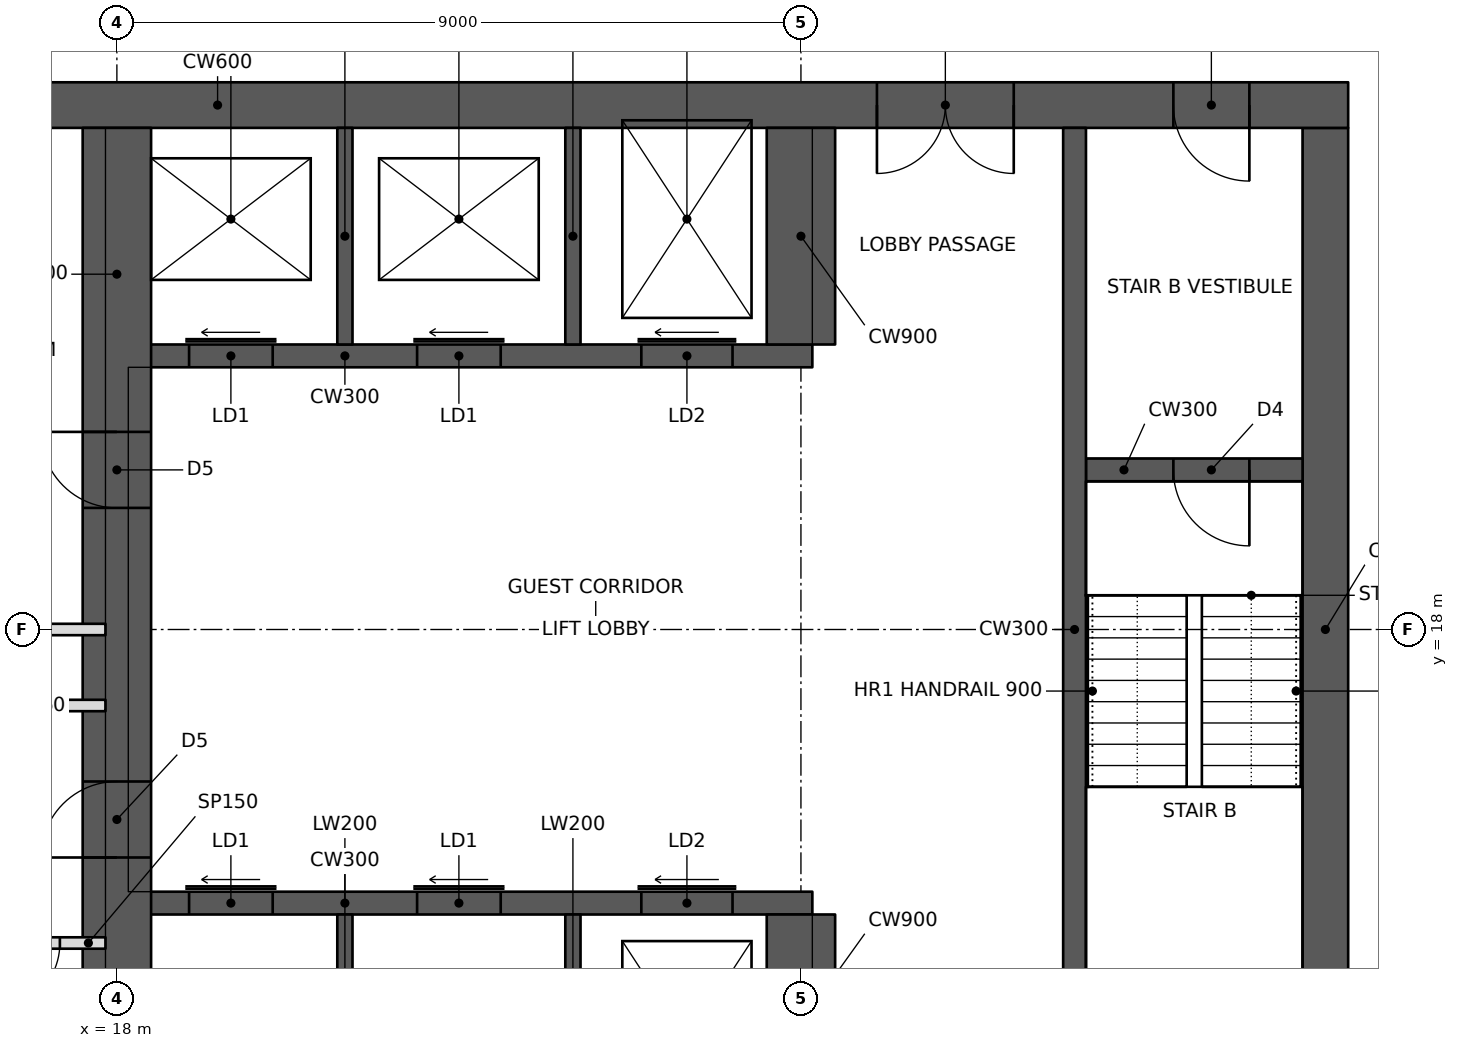
"""IFC4 building model, lengths in metres.
Left out: names, types, materials, properties, quantities, classifications, styles, units other than length and angle.
Written with IfcOpenShell. Run it as: python <this file> out.ifc"""

import sys

from ifc_helpers import new_model, si_unit, direction, frame, frame_2d, origin, place, context, subcontext, project, spatial, rectangle, extrude, element, fill, save


model = new_model("IFC4")
c1 = context("Model", 3, precision=1e-05, world=origin(), true_north=direction((0.0, 1.0)))
c2 = subcontext(c1, "Body", "Model", "MODEL_VIEW")
j1 = project(units=[si_unit("LENGTHUNIT", "METRE"), si_unit("PLANEANGLEUNIT", "RADIAN")], contexts=[c1])
p1 = place(None, origin())
s1 = spatial("IfcSite", under=j1, at=p1, CompositionType="ELEMENT")
p2 = place(p1, origin())
s2 = spatial("IfcBuilding", under=s1, at=p2, CompositionType="ELEMENT")
p3 = place(p2, frame((0.0, 0.0, 94.2)))
s3 = spatial("IfcBuildingStorey", under=s2, at=p3, CompositionType="ELEMENT", Elevation=94.2)
p4 = place(p3, frame((10.8, 24.9, 0.0), z_axis=(0.0, 0.0, 1.0), x_axis=(1.0, 0.0, 0.0)))
e1 = element("IfcWall", 1, at=p4, inside=s3, PredefinedType="SHEAR", context=c2, shape_type="SweptSolid", body=[
    extrude(rectangle(XDim=23.4, YDim=0.6, at=frame_2d((11.7, 0.0))), origin(), (0.0, 0.0, 1.0), 3.4),
])
p5 = place(p4, frame((17.2, 0.0, 0.0)))
e2 = element("IfcOpeningElement", 2, at=p5, cuts=e1, PredefinedType="OPENING", context=c2, shape_type="SweptSolid", body=[
    extrude(rectangle(XDim=1.8, YDim=2.1, at=frame_2d((0.9, 1.05))), frame((0.0, 0.31, 0.0), z_axis=(0.0, -1.0, 0.0), x_axis=(1.0, 0.0, 0.0)), (0.0, 0.0, 1.0), 0.62),
])
p6 = place(p4, frame((21.1, 0.0, 0.0)))
e3 = element("IfcOpeningElement", 3, at=p6, cuts=e1, PredefinedType="OPENING", context=c2, shape_type="SweptSolid", body=[
    extrude(rectangle(XDim=1.0, YDim=2.1, at=frame_2d((0.5, 1.05))), frame((0.0, 0.31, 0.0), z_axis=(0.0, -1.0, 0.0), x_axis=(1.0, 0.0, 0.0)), (0.0, 0.0, 1.0), 0.62),
])
p7 = place(p3, frame((33.9, 11.4, 0.0), z_axis=(0.0, 0.0, 1.0), x_axis=(0.0, 1.0, 0.0)))
e4 = element("IfcWall", 4, at=p7, inside=s3, PredefinedType="SHEAR", context=c2, shape_type="SweptSolid", body=[
    extrude(rectangle(XDim=13.2, YDim=0.6, at=frame_2d((6.6, 0.0))), origin(), (0.0, 0.0, 1.0), 3.4),
])
p8 = place(p3, frame((18.0, 11.4, 0.0), z_axis=(0.0, 0.0, 1.0), x_axis=(0.0, 1.0, 0.0)))
e5 = element("IfcWall", 5, at=p8, inside=s3, PredefinedType="SHEAR", context=c2, shape_type="SweptSolid", body=[
    extrude(rectangle(XDim=13.2, YDim=0.9, at=frame_2d((6.6, 0.0))), origin(), (0.0, 0.0, 1.0), 3.4),
])
p9 = place(p8, frame((3.6, 0.0, 0.0)))
e6 = element("IfcOpeningElement", 6, at=p9, cuts=e5, PredefinedType="OPENING", context=c2, shape_type="SweptSolid", body=[
    extrude(rectangle(XDim=1.0, YDim=2.1, at=frame_2d((0.5, 1.05))), frame((0.0, 0.46, 0.0), z_axis=(0.0, -1.0, 0.0), x_axis=(1.0, 0.0, 0.0)), (0.0, 0.0, 1.0), 0.92),
])
p10 = place(p8, frame((8.2, 0.0, 0.0)))
e7 = element("IfcOpeningElement", 7, at=p10, cuts=e5, PredefinedType="OPENING", context=c2, shape_type="SweptSolid", body=[
    extrude(rectangle(XDim=1.0, YDim=2.1, at=frame_2d((0.5, 1.05))), frame((0.0, 0.46, 0.0), z_axis=(0.0, -1.0, 0.0), x_axis=(1.0, 0.0, 0.0)), (0.0, 0.0, 1.0), 0.92),
])
p11 = place(p3, frame((14.55, 18.0, 0.0), z_axis=(0.0, 0.0, 1.0), x_axis=(1.0, 0.0, 0.0)))
e8 = element("IfcWall", 8, at=p11, inside=s3, PredefinedType="PARTITIONING", context=c2, shape_type="SweptSolid", body=[
    extrude(rectangle(XDim=3.3, YDim=0.15, at=frame_2d((1.65, 0.0))), origin(), (0.0, 0.0, 1.0), 3.2),
])
p12 = place(p3, frame((18.15, 14.4, 0.0), z_axis=(0.0, 0.0, 1.0), x_axis=(1.0, 0.0, 0.0)))
e9 = element("IfcWall", 9, at=p12, inside=s3, PredefinedType="SHEAR", context=c2, shape_type="SweptSolid", body=[
    extrude(rectangle(XDim=9.0, YDim=0.3, at=frame_2d((4.5, 0.0))), origin(), (0.0, 0.0, 1.0), 3.4),
])
p13 = place(p12, frame((0.8, 0.0, 0.0)))
e10 = element("IfcOpeningElement", 10, at=p13, cuts=e9, PredefinedType="OPENING", context=c2, shape_type="SweptSolid", body=[
    extrude(rectangle(XDim=1.1, YDim=2.1, at=frame_2d((0.55, 1.05))), frame((0.0, 0.16, 0.0), z_axis=(0.0, -1.0, 0.0), x_axis=(1.0, 0.0, 0.0)), (0.0, 0.0, 1.0), 0.32),
])
p14 = place(p12, frame((3.8, 0.0, 0.0)))
e11 = element("IfcOpeningElement", 11, at=p14, cuts=e9, PredefinedType="OPENING", context=c2, shape_type="SweptSolid", body=[
    extrude(rectangle(XDim=1.1, YDim=2.1, at=frame_2d((0.55, 1.05))), frame((0.0, 0.16, 0.0), z_axis=(0.0, -1.0, 0.0), x_axis=(1.0, 0.0, 0.0)), (0.0, 0.0, 1.0), 0.32),
])
p15 = place(p12, frame((6.75, 0.0, 0.0)))
e12 = element("IfcOpeningElement", 12, at=p15, cuts=e9, PredefinedType="OPENING", context=c2, shape_type="SweptSolid", body=[
    extrude(rectangle(XDim=1.2, YDim=2.1, at=frame_2d((0.6, 1.05))), frame((0.0, 0.16, 0.0), z_axis=(0.0, -1.0, 0.0), x_axis=(1.0, 0.0, 0.0)), (0.0, 0.0, 1.0), 0.32),
])
p16 = place(p3, frame((27.0, 11.4, 0.0), z_axis=(0.0, 0.0, 1.0), x_axis=(0.0, 1.0, 0.0)))
e13 = element("IfcWall", 13, at=p16, inside=s3, PredefinedType="SHEAR", context=c2, shape_type="SweptSolid", body=[
    extrude(rectangle(XDim=2.85, YDim=0.9, at=frame_2d((1.425, 0.0))), origin(), (0.0, 0.0, 1.0), 3.4),
])
for number, where, z_axis, x_axis in (
    (14, (21.0, 11.4, 0.0), (0.0, 0.0, 1.0), (0.0, 1.0, 0.0)),
    (15, (24.0, 11.4, 0.0), (0.0, 0.0, 1.0), (0.0, 1.0, 0.0)),
):
    element("IfcWall", number, at=place(p3, frame(where, z_axis=z_axis, x_axis=x_axis)), inside=s3, PredefinedType="SHEAR", context=c2, shape_type="SweptSolid", body=[
        extrude(rectangle(XDim=2.85, YDim=0.2, at=frame_2d((1.425, 0.0))), origin(), (0.0, 0.0, 1.0), 3.4),
    ])
p17 = place(p3, frame((18.15, 21.6, 0.0), z_axis=(0.0, 0.0, 1.0), x_axis=(1.0, 0.0, 0.0)))
e16 = element("IfcWall", 16, at=p17, inside=s3, PredefinedType="SHEAR", context=c2, shape_type="SweptSolid", body=[
    extrude(rectangle(XDim=9.0, YDim=0.3, at=frame_2d((4.5, 0.0))), origin(), (0.0, 0.0, 1.0), 3.4),
])
p18 = place(p17, frame((0.8, 0.0, 0.0)))
e17 = element("IfcOpeningElement", 17, at=p18, cuts=e16, PredefinedType="OPENING", context=c2, shape_type="SweptSolid", body=[
    extrude(rectangle(XDim=1.1, YDim=2.1, at=frame_2d((0.55, 1.05))), frame((0.0, 0.16, 0.0), z_axis=(0.0, -1.0, 0.0), x_axis=(1.0, 0.0, 0.0)), (0.0, 0.0, 1.0), 0.32),
])
p19 = place(p17, frame((3.8, 0.0, 0.0)))
e18 = element("IfcOpeningElement", 18, at=p19, cuts=e16, PredefinedType="OPENING", context=c2, shape_type="SweptSolid", body=[
    extrude(rectangle(XDim=1.1, YDim=2.1, at=frame_2d((0.55, 1.05))), frame((0.0, 0.16, 0.0), z_axis=(0.0, -1.0, 0.0), x_axis=(1.0, 0.0, 0.0)), (0.0, 0.0, 1.0), 0.32),
])
p20 = place(p17, frame((6.75, 0.0, 0.0)))
e19 = element("IfcOpeningElement", 19, at=p20, cuts=e16, PredefinedType="OPENING", context=c2, shape_type="SweptSolid", body=[
    extrude(rectangle(XDim=1.2, YDim=2.1, at=frame_2d((0.6, 1.05))), frame((0.0, 0.16, 0.0), z_axis=(0.0, -1.0, 0.0), x_axis=(1.0, 0.0, 0.0)), (0.0, 0.0, 1.0), 0.32),
])
p21 = place(p3, frame((27.0, 21.75, 0.0), z_axis=(0.0, 0.0, 1.0), x_axis=(0.0, 1.0, 0.0)))
e20 = element("IfcWall", 20, at=p21, inside=s3, PredefinedType="SHEAR", context=c2, shape_type="SweptSolid", body=[
    extrude(rectangle(XDim=2.85, YDim=0.9, at=frame_2d((1.425, 0.0))), origin(), (0.0, 0.0, 1.0), 3.4),
])
for number, where, z_axis, x_axis in (
    (21, (21.0, 21.75, 0.0), (0.0, 0.0, 1.0), (0.0, 1.0, 0.0)),
    (22, (24.0, 21.75, 0.0), (0.0, 0.0, 1.0), (0.0, 1.0, 0.0)),
):
    element("IfcWall", number, at=place(p3, frame(where, z_axis=z_axis, x_axis=x_axis)), inside=s3, PredefinedType="SHEAR", context=c2, shape_type="SweptSolid", body=[
        extrude(rectangle(XDim=2.85, YDim=0.2, at=frame_2d((1.425, 0.0))), origin(), (0.0, 0.0, 1.0), 3.4),
    ])
p22 = place(p3, frame((30.6, 11.4, 0.0), z_axis=(0.0, 0.0, 1.0), x_axis=(0.0, 1.0, 0.0)))
e23 = element("IfcWall", 23, at=p22, inside=s3, PredefinedType="SHEAR", context=c2, shape_type="SweptSolid", body=[
    extrude(rectangle(XDim=13.2, YDim=0.3, at=frame_2d((6.6, 0.0))), origin(), (0.0, 0.0, 1.0), 3.4),
])
p23 = place(p3, frame((30.75, 20.1, 0.0), z_axis=(0.0, 0.0, 1.0), x_axis=(1.0, 0.0, 0.0)))
e24 = element("IfcWall", 24, at=p23, inside=s3, PredefinedType="SHEAR", context=c2, shape_type="SweptSolid", body=[
    extrude(rectangle(XDim=2.85, YDim=0.3, at=frame_2d((1.425, 0.0))), origin(), (0.0, 0.0, 1.0), 3.4),
])
p24 = place(p23, frame((1.15, 0.0, 0.0)))
e25 = element("IfcOpeningElement", 25, at=p24, cuts=e24, PredefinedType="OPENING", context=c2, shape_type="SweptSolid", body=[
    extrude(rectangle(XDim=1.0, YDim=2.1, at=frame_2d((0.5, 1.05))), frame((0.0, 0.16, 0.0), z_axis=(0.0, -1.0, 0.0), x_axis=(1.0, 0.0, 0.0)), (0.0, 0.0, 1.0), 0.32),
])
p25 = place(p3, frame((14.55, 17.0, 0.0), z_axis=(0.0, 0.0, 1.0), x_axis=(1.0, 0.0, 0.0)))
e26 = element("IfcWall", 26, at=p25, inside=s3, PredefinedType="PARTITIONING", context=c2, shape_type="SweptSolid", body=[
    extrude(rectangle(XDim=3.3, YDim=0.15, at=frame_2d((1.65, 0.0))), origin(), (0.0, 0.0, 1.0), 3.2),
])
p26 = place(p25, frame((0.3, 0.0, 0.0)))
e27 = element("IfcOpeningElement", 27, at=p26, cuts=e26, PredefinedType="OPENING", context=c2, shape_type="SweptSolid", body=[
    extrude(rectangle(XDim=1.0, YDim=2.1, at=frame_2d((0.5, 1.05))), frame((0.0, 0.085, 0.0), z_axis=(0.0, -1.0, 0.0), x_axis=(1.0, 0.0, 0.0)), (0.0, 0.0, 1.0), 0.17),
])
p27 = place(p3, frame((14.55, 13.875, 0.0), z_axis=(0.0, 0.0, 1.0), x_axis=(1.0, 0.0, 0.0)))
e28 = element("IfcWall", 28, at=p27, inside=s3, PredefinedType="PARTITIONING", context=c2, shape_type="SweptSolid", body=[
    extrude(rectangle(XDim=3.3, YDim=0.15, at=frame_2d((1.65, 0.0))), origin(), (0.0, 0.0, 1.0), 3.2),
])
p28 = place(p27, frame((0.2, 0.0, 0.0)))
e29 = element("IfcOpeningElement", 29, at=p28, cuts=e28, PredefinedType="OPENING", context=c2, shape_type="SweptSolid", body=[
    extrude(rectangle(XDim=0.9, YDim=2.1, at=frame_2d((0.45, 1.05))), frame((0.0, 0.085, 0.0), z_axis=(0.0, -1.0, 0.0), x_axis=(1.0, 0.0, 0.0)), (0.0, 0.0, 1.0), 0.17),
])
p29 = place(p27, frame((1.8, 0.0, 0.0)))
e30 = element("IfcOpeningElement", 30, at=p29, cuts=e28, PredefinedType="OPENING", context=c2, shape_type="SweptSolid", body=[
    extrude(rectangle(XDim=0.9, YDim=2.1, at=frame_2d((0.45, 1.05))), frame((0.0, 0.085, 0.0), z_axis=(0.0, -1.0, 0.0), x_axis=(1.0, 0.0, 0.0)), (0.0, 0.0, 1.0), 0.17),
])
p30 = place(p29, frame((0.9, 0.0, 0.0), z_axis=(0.0, 0.0, 1.0), x_axis=(-1.0, 0.0, 0.0)))
e31 = element("IfcDoor", 31, at=p30, inside=s3, OperationType="SINGLE_SWING_RIGHT", PredefinedType="DOOR", context=c2, shape_type="SweptSolid", body=[
    extrude(rectangle(XDim=0.9, YDim=2.1, at=frame_2d((0.45, 1.05))), frame((0.0, 0.025, 0.0), z_axis=(0.0, -1.0, 0.0), x_axis=(1.0, 0.0, 0.0)), (0.0, 0.0, 1.0), 0.05),
])
fill(e30, e31)
p31 = place(p5, frame((1.8, 0.0, 0.0), z_axis=(0.0, 0.0, 1.0), x_axis=(-1.0, 0.0, 0.0)))
e32 = element("IfcDoor", 32, at=p31, inside=s3, OperationType="DOUBLE_DOOR_SINGLE_SWING", PredefinedType="DOOR", context=c2, shape_type="SweptSolid", body=[
    extrude(rectangle(XDim=1.8, YDim=2.1, at=frame_2d((0.9, 1.05))), frame((0.0, 0.025, 0.0), z_axis=(0.0, -1.0, 0.0), x_axis=(1.0, 0.0, 0.0)), (0.0, 0.0, 1.0), 0.05),
])
fill(e2, e32)
p32 = place(p6, frame((1.0, 0.0, 0.0), z_axis=(0.0, 0.0, 1.0), x_axis=(-1.0, 0.0, 0.0)))
e33 = element("IfcDoor", 33, at=p32, inside=s3, OperationType="SINGLE_SWING_LEFT", PredefinedType="DOOR", context=c2, shape_type="SweptSolid", body=[
    extrude(rectangle(XDim=1.0, YDim=2.1, at=frame_2d((0.5, 1.05))), frame((0.0, 0.025, 0.0), z_axis=(0.0, -1.0, 0.0), x_axis=(1.0, 0.0, 0.0)), (0.0, 0.0, 1.0), 0.05),
])
fill(e3, e33)
p33 = place(p24, frame((1.0, 0.0, 0.0), z_axis=(0.0, 0.0, 1.0), x_axis=(-1.0, 0.0, 0.0)))
e34 = element("IfcDoor", 34, at=p33, inside=s3, OperationType="SINGLE_SWING_LEFT", PredefinedType="DOOR", context=c2, shape_type="SweptSolid", body=[
    extrude(rectangle(XDim=1.0, YDim=2.1, at=frame_2d((0.5, 1.05))), frame((0.0, 0.025, 0.0), z_axis=(0.0, -1.0, 0.0), x_axis=(1.0, 0.0, 0.0)), (0.0, 0.0, 1.0), 0.05),
])
fill(e25, e34)
p34 = place(p9, origin())
e35 = element("IfcDoor", 35, at=p34, inside=s3, OperationType="SINGLE_SWING_LEFT", PredefinedType="DOOR", context=c2, shape_type="SweptSolid", body=[
    extrude(rectangle(XDim=1.0, YDim=2.1, at=frame_2d((0.5, 1.05))), frame((0.0, 0.025, 0.0), z_axis=(0.0, -1.0, 0.0), x_axis=(1.0, 0.0, 0.0)), (0.0, 0.0, 1.0), 0.05),
])
fill(e6, e35)
p35 = place(p10, origin())
e36 = element("IfcDoor", 36, at=p35, inside=s3, OperationType="SINGLE_SWING_RIGHT", PredefinedType="DOOR", context=c2, shape_type="SweptSolid", body=[
    extrude(rectangle(XDim=1.0, YDim=2.1, at=frame_2d((0.5, 1.05))), frame((0.0, 0.025, 0.0), z_axis=(0.0, -1.0, 0.0), x_axis=(1.0, 0.0, 0.0)), (0.0, 0.0, 1.0), 0.05),
])
fill(e7, e36)
p36 = place(p13, origin())
e37 = element("IfcDoor", 37, at=p36, inside=s3, OperationType="SLIDING_TO_LEFT", PredefinedType="DOOR", context=c2, shape_type="SweptSolid", body=[
    extrude(rectangle(XDim=1.1, YDim=2.1, at=frame_2d((0.55, 1.05))), frame((0.0, 0.025, 0.0), z_axis=(0.0, -1.0, 0.0), x_axis=(1.0, 0.0, 0.0)), (0.0, 0.0, 1.0), 0.05),
])
fill(e10, e37)
p37 = place(p14, origin())
e38 = element("IfcDoor", 38, at=p37, inside=s3, OperationType="SLIDING_TO_LEFT", PredefinedType="DOOR", context=c2, shape_type="SweptSolid", body=[
    extrude(rectangle(XDim=1.1, YDim=2.1, at=frame_2d((0.55, 1.05))), frame((0.0, 0.025, 0.0), z_axis=(0.0, -1.0, 0.0), x_axis=(1.0, 0.0, 0.0)), (0.0, 0.0, 1.0), 0.05),
])
fill(e11, e38)
p38 = place(p18, origin())
e39 = element("IfcDoor", 39, at=p38, inside=s3, OperationType="SLIDING_TO_LEFT", PredefinedType="DOOR", context=c2, shape_type="SweptSolid", body=[
    extrude(rectangle(XDim=1.1, YDim=2.1, at=frame_2d((0.55, 1.05))), frame((0.0, 0.025, 0.0), z_axis=(0.0, -1.0, 0.0), x_axis=(1.0, 0.0, 0.0)), (0.0, 0.0, 1.0), 0.05),
])
fill(e17, e39)
p39 = place(p19, origin())
e40 = element("IfcDoor", 40, at=p39, inside=s3, OperationType="SLIDING_TO_LEFT", PredefinedType="DOOR", context=c2, shape_type="SweptSolid", body=[
    extrude(rectangle(XDim=1.1, YDim=2.1, at=frame_2d((0.55, 1.05))), frame((0.0, 0.025, 0.0), z_axis=(0.0, -1.0, 0.0), x_axis=(1.0, 0.0, 0.0)), (0.0, 0.0, 1.0), 0.05),
])
fill(e18, e40)
p40 = place(p15, origin())
e41 = element("IfcDoor", 41, at=p40, inside=s3, OperationType="SLIDING_TO_LEFT", PredefinedType="DOOR", context=c2, shape_type="SweptSolid", body=[
    extrude(rectangle(XDim=1.2, YDim=2.1, at=frame_2d((0.6, 1.05))), frame((0.0, 0.025, 0.0), z_axis=(0.0, -1.0, 0.0), x_axis=(1.0, 0.0, 0.0)), (0.0, 0.0, 1.0), 0.05),
])
fill(e12, e41)
p41 = place(p20, origin())
e42 = element("IfcDoor", 42, at=p41, inside=s3, OperationType="SLIDING_TO_LEFT", PredefinedType="DOOR", context=c2, shape_type="SweptSolid", body=[
    extrude(rectangle(XDim=1.2, YDim=2.1, at=frame_2d((0.6, 1.05))), frame((0.0, 0.025, 0.0), z_axis=(0.0, -1.0, 0.0), x_axis=(1.0, 0.0, 0.0)), (0.0, 0.0, 1.0), 0.05),
])
fill(e19, e42)
save(model, sys.argv[1])
